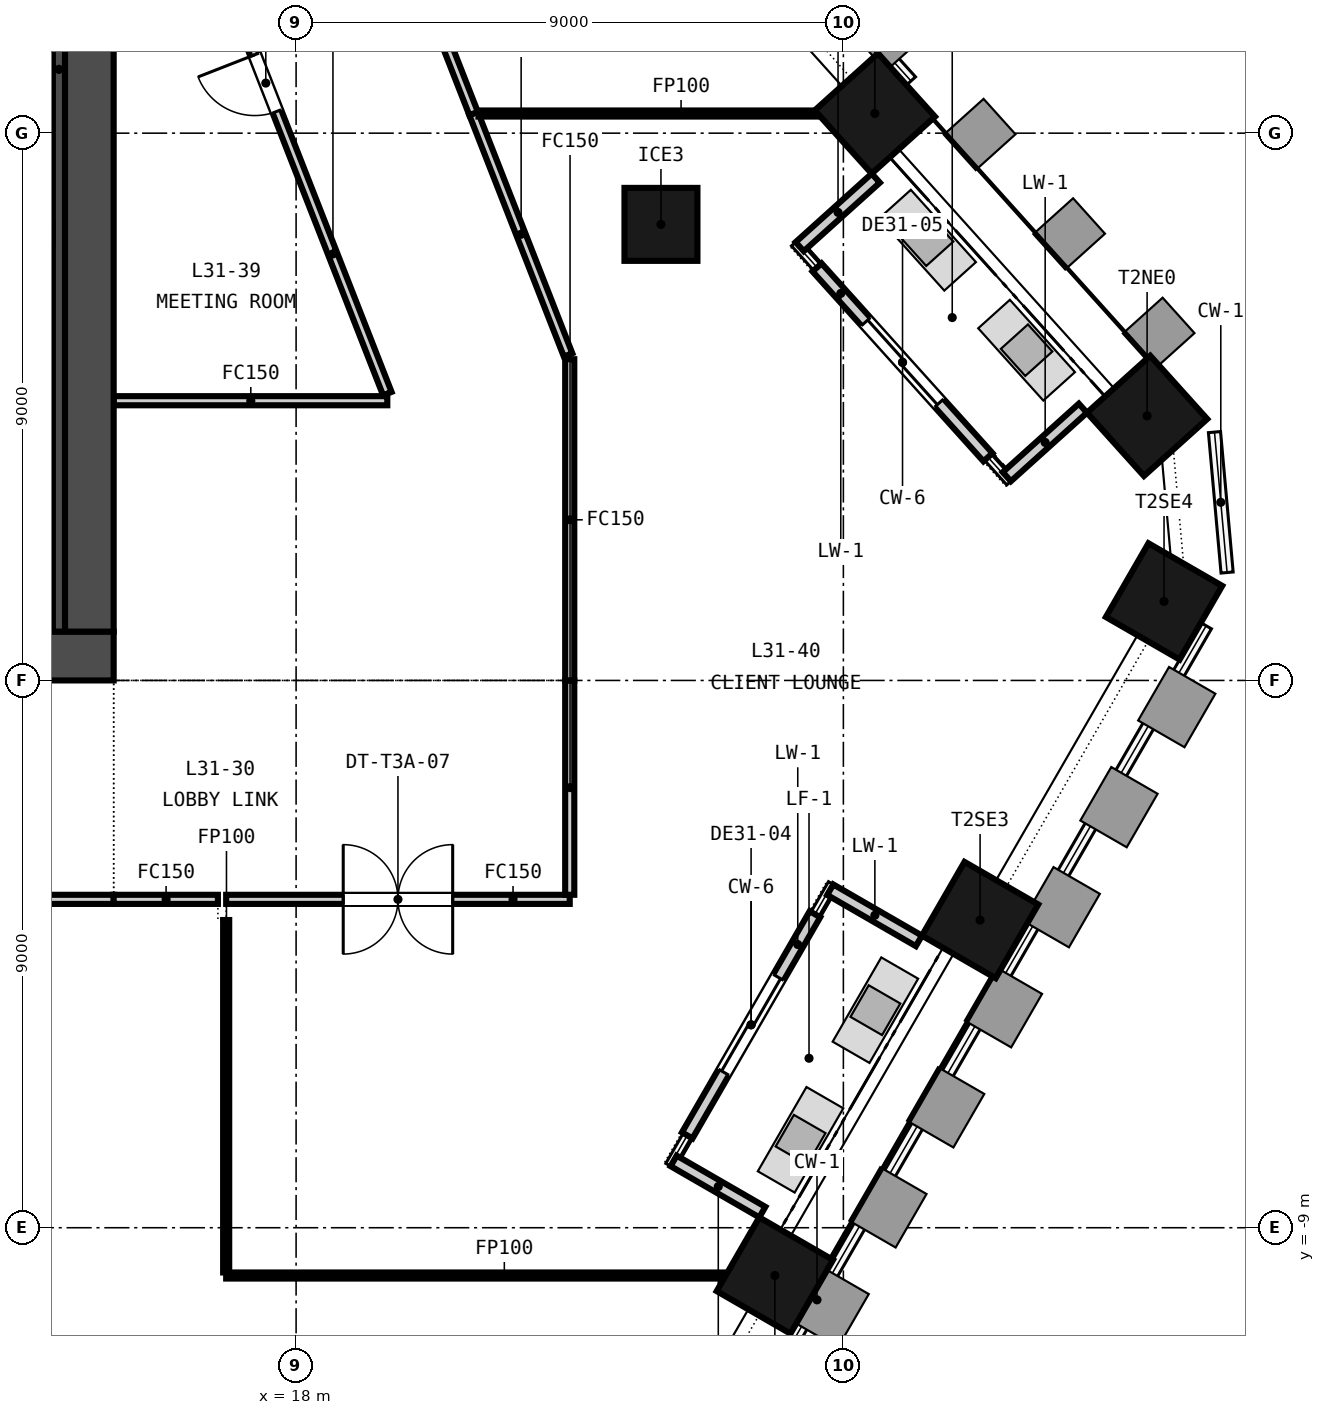
"""IFC4 building model, lengths in metres.
Left out: names, types, materials, properties, quantities, classifications, styles, units other than length and angle.
Written with IfcOpenShell. Run it as: python <this file> out.ifc"""

import sys

from ifc_helpers import new_model, si_unit, direction, frame, frame_2d, origin, origin_2d, place, context, subcontext, project, spatial, rectangle, extrude, element, fill, save


model = new_model("IFC4")
c1 = context("Model", 3, precision=1e-05, world=origin(), true_north=direction((0.0, 1.0)))
c2 = subcontext(c1, "Body", "Model", "MODEL_VIEW")
j1 = project(units=[si_unit("LENGTHUNIT", "METRE"), si_unit("PLANEANGLEUNIT", "RADIAN")], contexts=[c1])
p1 = place(None, origin())
s1 = spatial("IfcSite", under=j1, at=p1, CompositionType="ELEMENT")
p2 = place(p1, origin())
s2 = spatial("IfcBuilding", under=s1, at=p2, CompositionType="ELEMENT")
p3 = place(p2, frame((0.0, 0.0, 129.8)))
s3 = spatial("IfcBuildingStorey", under=s2, at=p3, CompositionType="ELEMENT", Elevation=129.8)
p4 = place(p3, frame((-15.0, 0.4, -0.15), z_axis=(0.0, 0.0, 1.0), x_axis=(1.0, 0.0, 0.0)))
e1 = element("IfcWall", 1, at=p4, inside=s3, PredefinedType="SOLIDWALL", context=c2, shape_type="SweptSolid", body=[
    extrude(rectangle(XDim=30.0, YDim=0.8, at=frame_2d((15.0, 0.0))), origin(), (0.0, 0.0, 1.0), 3.65),
])
p5 = place(p4, frame((5.8, 0.0, 0.15)))
e2 = element("IfcOpeningElement", 2, at=p5, cuts=e1, PredefinedType="OPENING", context=c2, shape_type="SweptSolid", body=[
    extrude(rectangle(XDim=2.4, YDim=2.4, at=frame_2d((1.2, 1.2))), frame((0.0, 0.41, 0.0), z_axis=(0.0, -1.0, 0.0), x_axis=(1.0, 0.0, 0.0)), (0.0, 0.0, 1.0), 0.82),
])
p6 = place(p4, frame((13.8, 0.0, 0.15)))
e3 = element("IfcOpeningElement", 3, at=p6, cuts=e1, PredefinedType="OPENING", context=c2, shape_type="SweptSolid", body=[
    extrude(rectangle(XDim=2.4, YDim=2.4, at=frame_2d((1.2, 1.2))), frame((0.0, 0.41, 0.0), z_axis=(0.0, -1.0, 0.0), x_axis=(1.0, 0.0, 0.0)), (0.0, 0.0, 1.0), 0.82),
])
p7 = place(p4, frame((21.8, 0.0, 0.15)))
e4 = element("IfcOpeningElement", 4, at=p7, cuts=e1, PredefinedType="OPENING", context=c2, shape_type="SweptSolid", body=[
    extrude(rectangle(XDim=2.4, YDim=2.4, at=frame_2d((1.2, 1.2))), frame((0.0, 0.41, 0.0), z_axis=(0.0, -1.0, 0.0), x_axis=(1.0, 0.0, 0.0)), (0.0, 0.0, 1.0), 0.82),
])
p8 = place(p4, frame((1.5, 0.0, 0.15)))
e5 = element("IfcOpeningElement", 5, at=p8, cuts=e1, PredefinedType="OPENING", context=c2, shape_type="SweptSolid", body=[
    extrude(rectangle(XDim=1.2, YDim=2.1, at=frame_2d((0.6, 1.05))), frame((0.0, 0.41, 0.0), z_axis=(0.0, -1.0, 0.0), x_axis=(1.0, 0.0, 0.0)), (0.0, 0.0, 1.0), 0.82),
])
p9 = place(p4, frame((27.3, 0.0, 0.15)))
e6 = element("IfcOpeningElement", 6, at=p9, cuts=e1, PredefinedType="OPENING", context=c2, shape_type="SweptSolid", body=[
    extrude(rectangle(XDim=1.2, YDim=2.1, at=frame_2d((0.6, 1.05))), frame((0.0, 0.41, 0.0), z_axis=(0.0, -1.0, 0.0), x_axis=(1.0, 0.0, 0.0)), (0.0, 0.0, 1.0), 0.82),
])
p10 = place(p3, frame((14.6, 0.8, -0.15), z_axis=(0.0, 0.0, 1.0), x_axis=(0.0, 1.0, 0.0)))
e7 = element("IfcWall", 7, at=p10, inside=s3, PredefinedType="SOLIDWALL", context=c2, shape_type="SweptSolid", body=[
    extrude(rectangle(XDim=13.4, YDim=0.8, at=frame_2d((6.7, 0.0))), origin(), (0.0, 0.0, 1.0), 3.65),
])
for number, where, z_axis, x_axis in (
    (8, (25.873, -9.786, -0.15), (0.0, 0.0, 1.0), (0.5, 0.866, 0.0)),
    (9, (29.248, -3.94, -0.15), (0.0, 0.0, 1.0), (0.5, 0.866, 0.0)),
    (10, (32.273, 1.299, -0.15), (0.0, 0.0, 1.0), (0.5, 0.866, 0.0)),
    (11, (31.995, 4.351, -0.15), (0.0, 0.0, 1.0), (-0.669, 0.743, 0.0)),
    (12, (27.518, 9.323, -0.15), (0.0, 0.0, 1.0), (-0.669, 0.743, 0.0)),
):
    element("IfcColumn", number, at=place(p3, frame(where, z_axis=z_axis, x_axis=x_axis)), inside=s3, PredefinedType="COLUMN", context=c2, shape_type="SweptSolid", body=[
        extrude(rectangle(XDim=1.4, YDim=1.4, at=origin_2d()), origin(), (0.0, 0.0, 1.0), 3.65),
    ])
p11 = place(p3, frame((24.0, 7.5, -0.15), z_axis=(0.0, 0.0, 1.0), x_axis=(1.0, 0.0, 0.0)))
e13 = element("IfcColumn", 13, at=p11, inside=s3, PredefinedType="COLUMN", context=c2, shape_type="SweptSolid", body=[
    extrude(rectangle(XDim=1.2, YDim=1.2, at=origin_2d()), origin(), (0.0, 0.0, 1.0), 3.65),
])
p12 = place(p3, frame((24.432, -7.482, 0.0), z_axis=(0.0, 0.0, 1.0), x_axis=(0.500002543286, 0.866023935413, 0.0)))
e14 = element("IfcWall", 14, at=p12, inside=s3, PredefinedType="SOLIDWALL", context=c2, shape_type="SweptSolid", body=[
    extrude(rectangle(XDim=4.2, YDim=0.2, at=frame_2d((2.1, 0.0))), origin(), (0.0, 0.0, 1.0), 3.049),
])
p13 = place(p12, frame((1.2, 0.0, 0.0)))
e15 = element("IfcOpeningElement", 15, at=p13, cuts=e14, PredefinedType="OPENING", context=c2, shape_type="SweptSolid", body=[
    extrude(rectangle(XDim=1.8, YDim=2.4, at=frame_2d((0.9, 1.2))), frame((0.0, 0.11, 0.0), z_axis=(0.0, -1.0, 0.0), x_axis=(1.0, 0.0, 0.0)), (0.0, 0.0, 1.0), 0.22),
])
for number, where, z_axis, x_axis in (
    (16, (25.667, -8.743, 0.0), (0.0, 0.0, 1.0), (-0.866, 0.5, 0.0)),
    (17, (28.242, -4.283, 0.0), (0.0, 0.0, 1.0), (-0.866, 0.5, 0.0)),
):
    element("IfcWall", number, at=place(p3, frame(where, z_axis=z_axis, x_axis=x_axis)), inside=s3, PredefinedType="SOLIDWALL", context=c2, shape_type="SweptSolid", body=[
        extrude(rectangle(XDim=1.684, YDim=0.2, at=frame_2d((0.842, 0.0))), origin(), (0.0, 0.0, 1.0), 3.05),
    ])
p14 = place(p3, frame((29.378, 3.67, 0.0), z_axis=(0.0, 0.0, 1.0), x_axis=(-0.669109235636, 0.743164067206, 0.0)))
e18 = element("IfcWall", 18, at=p14, inside=s3, PredefinedType="SOLIDWALL", context=c2, shape_type="SweptSolid", body=[
    extrude(rectangle(XDim=4.2, YDim=0.2, at=frame_2d((2.1, 0.0))), origin(), (0.0, 0.0, 1.0), 2.9),
])
p15 = place(p14, frame((1.2, 0.0, 0.0)))
e19 = element("IfcOpeningElement", 19, at=p15, cuts=e18, PredefinedType="OPENING", context=c2, shape_type="SweptSolid", body=[
    extrude(rectangle(XDim=1.8, YDim=2.4, at=frame_2d((0.9, 1.2))), frame((0.0, 0.11, 0.0), z_axis=(0.0, -1.0, 0.0), x_axis=(1.0, 0.0, 0.0)), (0.0, 0.0, 1.0), 0.22),
])
p16 = place(p3, frame((30.939, 4.477, 0.0), z_axis=(0.0, 0.0, 1.0), x_axis=(-0.743106699699, -0.6691729469, 0.0)))
e20 = element("IfcWall", 20, at=p16, inside=s3, PredefinedType="SOLIDWALL", context=c2, shape_type="SweptSolid", body=[
    extrude(rectangle(XDim=1.684, YDim=0.2, at=frame_2d((0.842, 0.0))), origin(), (0.0, 0.0, 1.0), 3.05),
])
p17 = place(p3, frame((27.533, 8.26, 0.0), z_axis=(0.0, 0.0, 1.0), x_axis=(-0.743106699699, -0.6691729469, 0.0)))
e21 = element("IfcWall", 21, at=p17, inside=s3, PredefinedType="SOLIDWALL", context=c2, shape_type="SweptSolid", body=[
    extrude(rectangle(XDim=1.684, YDim=0.2, at=frame_2d((0.842, 0.0))), origin(), (0.0, 0.0, 1.0), 2.967),
])
p18 = place(p3, frame((11.05, 7.35, 0.0), z_axis=(0.0, 0.0, 1.0), x_axis=(1.0, 0.0, 0.0)))
e22 = element("IfcWall", 22, at=p18, inside=s3, PredefinedType="SOLIDWALL", context=c2, shape_type="SweptSolid", body=[
    extrude(rectangle(XDim=2.95, YDim=0.3, at=frame_2d((1.475, 0.0))), origin(), (0.0, 0.0, 1.0), 3.5),
])
p19 = place(p3, frame((14.1, 0.8, 0.0), z_axis=(0.0, 0.0, 1.0), x_axis=(0.0, 1.0, 0.0)))
e23 = element("IfcWall", 23, at=p19, inside=s3, PredefinedType="SOLIDWALL", context=c2, shape_type="SweptSolid", body=[
    extrude(rectangle(XDim=13.4, YDim=0.2, at=frame_2d((6.7, 0.0))), origin(), (0.0, 0.0, 1.0), 3.5),
])
p20 = place(p3, frame((15.0, -3.6, 0.0), z_axis=(0.0, 0.0, 1.0), x_axis=(-1.0, 0.0, 0.0)))
e24 = element("IfcWall", 24, at=p20, inside=s3, PredefinedType="PARTITIONING", context=c2, shape_type="SweptSolid", body=[
    extrude(rectangle(XDim=30.0, YDim=0.15, at=frame_2d((15.0, 0.0))), origin(), (0.0, 0.0, 1.0), 2.741),
])
p21 = place(p20, frame((14.1, 0.0, 0.0)))
e25 = element("IfcOpeningElement", 25, at=p21, cuts=e24, PredefinedType="OPENING", context=c2, shape_type="SweptSolid", body=[
    extrude(rectangle(XDim=1.8, YDim=2.1, at=frame_2d((0.9, 1.05))), frame((0.0, 0.085, 0.0), z_axis=(0.0, -1.0, 0.0), x_axis=(1.0, 0.0, 0.0)), (0.0, 0.0, 1.0), 0.17),
])
p22 = place(p3, frame((22.5, -3.6, 0.0), z_axis=(0.0, 0.0, 1.0), x_axis=(-1.0, 0.0, 0.0)))
e26 = element("IfcWall", 26, at=p22, inside=s3, PredefinedType="PARTITIONING", context=c2, shape_type="SweptSolid", body=[
    extrude(rectangle(XDim=5.65, YDim=0.15, at=frame_2d((2.825, 0.0))), origin(), (0.0, 0.0, 1.0), 2.741),
])
p23 = place(p22, frame((1.925, 0.0, 0.0)))
e27 = element("IfcOpeningElement", 27, at=p23, cuts=e26, PredefinedType="OPENING", context=c2, shape_type="SweptSolid", body=[
    extrude(rectangle(XDim=1.8, YDim=2.1, at=frame_2d((0.9, 1.05))), frame((0.0, 0.085, 0.0), z_axis=(0.0, -1.0, 0.0), x_axis=(1.0, 0.0, 0.0)), (0.0, 0.0, 1.0), 0.17),
])
p24 = place(p3, frame((22.5, 0.0, 0.0), z_axis=(0.0, 0.0, 1.0), x_axis=(0.0, -1.0, 0.0)))
e28 = element("IfcWall", 28, at=p24, inside=s3, PredefinedType="PARTITIONING", context=c2, shape_type="SweptSolid", body=[
    extrude(rectangle(XDim=3.525, YDim=0.15, at=frame_2d((1.762, 0.0))), origin(), (0.0, 0.0, 1.0), 2.741),
])
p25 = place(p3, frame((16.714, -3.6, 0.0), z_axis=(0.0, 0.0, 1.0), x_axis=(-1.0, 0.0, 0.0)))
e29 = element("IfcWall", 29, at=p25, inside=s3, PredefinedType="PARTITIONING", context=c2, shape_type="SweptSolid", body=[
    extrude(rectangle(XDim=1.714, YDim=0.15, at=frame_2d((0.857, 0.0))), origin(), (0.0, 0.0, 1.0), 2.741),
])
p26 = place(p3, frame((19.5, 4.717, 0.0), z_axis=(0.0, 0.0, 1.0), x_axis=(-0.364410260026, 0.931238509936, 0.0)))
e30 = element("IfcWall", 30, at=p26, inside=s3, PredefinedType="PARTITIONING", context=c2, shape_type="SweptSolid", body=[
    extrude(rectangle(XDim=10.967, YDim=0.15, at=frame_2d((5.484, 0.0))), origin(), (0.0, 0.0, 1.0), 2.741),
])
p27 = place(p26, frame((4.984, 0.0, 0.0)))
e31 = element("IfcOpeningElement", 31, at=p27, cuts=e30, PredefinedType="OPENING", context=c2, shape_type="SweptSolid", body=[
    extrude(rectangle(XDim=1.0, YDim=2.1, at=frame_2d((0.5, 1.05))), frame((0.0, 0.085, 0.0), z_axis=(0.0, -1.0, 0.0), x_axis=(1.0, 0.0, 0.0)), (0.0, 0.0, 1.0), 0.17),
])
p28 = place(p3, frame((22.5, 5.283, 0.0), z_axis=(0.0, 0.0, 1.0), x_axis=(0.0, -1.0, 0.0)))
e32 = element("IfcWall", 32, at=p28, inside=s3, PredefinedType="PARTITIONING", context=c2, shape_type="SweptSolid", body=[
    extrude(rectangle(XDim=5.283, YDim=0.15, at=frame_2d((2.642, 0.0))), origin(), (0.0, 0.0, 1.0), 2.741),
])
p29 = place(p3, frame((15.0, 4.6, 0.0), z_axis=(0.0, 0.0, 1.0), x_axis=(1.0, 0.0, 0.0)))
e33 = element("IfcWall", 33, at=p29, inside=s3, PredefinedType="PARTITIONING", context=c2, shape_type="SweptSolid", body=[
    extrude(rectangle(XDim=4.5, YDim=0.15, at=frame_2d((2.25, 0.0))), origin(), (0.0, 0.0, 1.0), 2.741),
])
p30 = place(p3, frame((20.919, 9.323, 0.0), z_axis=(0.0, 0.0, 1.0), x_axis=(0.364429576393, -0.931230950865, 0.0)))
e34 = element("IfcWall", 34, at=p30, inside=s3, PredefinedType="PARTITIONING", context=c2, shape_type="SweptSolid", body=[
    extrude(rectangle(XDim=4.263, YDim=0.15, at=frame_2d((2.132, 0.0))), origin(), (0.0, 0.0, 1.0), 2.741),
])
p31 = place(p3, frame((16.85, -9.786, 0.0), z_axis=(0.0, 0.0, 1.0), x_axis=(1.0, 0.0, 0.0)))
e35 = element("IfcWall", 35, at=p31, inside=s3, PredefinedType="PARTITIONING", context=c2, shape_type="SweptSolid", body=[
    extrude(rectangle(XDim=9.139, YDim=0.1, at=frame_2d((4.569, 0.0))), origin(), (0.0, 0.0, 1.0), 2.741),
])
p32 = place(p3, frame((16.85, -9.736, 0.0), z_axis=(0.0, 0.0, 1.0), x_axis=(0.0, 1.0, 0.0)))
e36 = element("IfcWall", 36, at=p32, inside=s3, PredefinedType="PARTITIONING", context=c2, shape_type="SweptSolid", body=[
    extrude(rectangle(XDim=5.796, YDim=0.1, at=frame_2d((2.898, 0.0))), origin(), (0.0, 0.0, 1.0), 2.741),
])
p33 = place(p3, frame((18.4, 15.76, 0.0), z_axis=(0.0, 0.0, 1.0), x_axis=(0.364425982763, -0.931232357195, 0.0)))
e37 = element("IfcWall", 37, at=p33, inside=s3, PredefinedType="PARTITIONING", context=c2, shape_type="SweptSolid", body=[
    extrude(rectangle(XDim=6.912, YDim=0.15, at=frame_2d((3.456, 0.0))), origin(), (0.0, 0.0, 1.0), 2.741),
])
p34 = place(p33, frame((2.956, 0.0, 0.0)))
e38 = element("IfcOpeningElement", 38, at=p34, cuts=e37, PredefinedType="OPENING", context=c2, shape_type="SweptSolid", body=[
    extrude(rectangle(XDim=1.0, YDim=2.1, at=frame_2d((0.5, 1.05))), frame((0.0, 0.085, 0.0), z_axis=(0.0, -1.0, 0.0), x_axis=(1.0, 0.0, 0.0)), (0.0, 0.0, 1.0), 0.17),
])
p35 = place(p3, frame((21.0, 9.323, 0.0), z_axis=(0.0, 0.0, 1.0), x_axis=(1.0, 0.0, 0.0)))
e39 = element("IfcWall", 39, at=p35, inside=s3, PredefinedType="PARTITIONING", context=c2, shape_type="SweptSolid", body=[
    extrude(rectangle(XDim=6.653, YDim=0.1, at=frame_2d((3.326, 0.0))), origin(), (0.0, 0.0, 1.0), 2.741),
])
p36 = place(p13, origin())
e40 = element("IfcDoor", 40, at=p36, inside=s3, OperationType="SINGLE_SWING_LEFT", PredefinedType="DOOR", context=c2, shape_type="SweptSolid", body=[
    extrude(rectangle(XDim=1.8, YDim=2.4, at=frame_2d((0.9, 1.2))), frame((0.0, 0.025, 0.0), z_axis=(0.0, -1.0, 0.0), x_axis=(1.0, 0.0, 0.0)), (0.0, 0.0, 1.0), 0.05),
])
fill(e15, e40)
p37 = place(p15, origin())
e41 = element("IfcDoor", 41, at=p37, inside=s3, OperationType="SINGLE_SWING_LEFT", PredefinedType="DOOR", context=c2, shape_type="SweptSolid", body=[
    extrude(rectangle(XDim=1.8, YDim=2.4, at=frame_2d((0.9, 1.2))), frame((0.0, 0.025, 0.0), z_axis=(0.0, -1.0, 0.0), x_axis=(1.0, 0.0, 0.0)), (0.0, 0.0, 1.0), 0.05),
])
fill(e19, e41)
p38 = place(p27, origin())
e42 = element("IfcDoor", 42, at=p38, inside=s3, OperationType="SINGLE_SWING_RIGHT", PredefinedType="DOOR", context=c2, shape_type="SweptSolid", body=[
    extrude(rectangle(XDim=1.0, YDim=2.1, at=frame_2d((0.5, 1.05))), frame((0.0, 0.025, 0.0), z_axis=(0.0, -1.0, 0.0), x_axis=(1.0, 0.0, 0.0)), (0.0, 0.0, 1.0), 0.05),
])
fill(e31, e42)
p39 = place(p23, origin())
e43 = element("IfcDoor", 43, at=p39, inside=s3, OperationType="DOUBLE_DOOR_DOUBLE_SWING", PredefinedType="DOOR", context=c2, shape_type="SweptSolid", body=[
    extrude(rectangle(XDim=1.8, YDim=2.1, at=frame_2d((0.9, 1.05))), frame((0.0, 0.025, 0.0), z_axis=(0.0, -1.0, 0.0), x_axis=(1.0, 0.0, 0.0)), (0.0, 0.0, 1.0), 0.05),
])
fill(e27, e43)
save(model, sys.argv[1])
